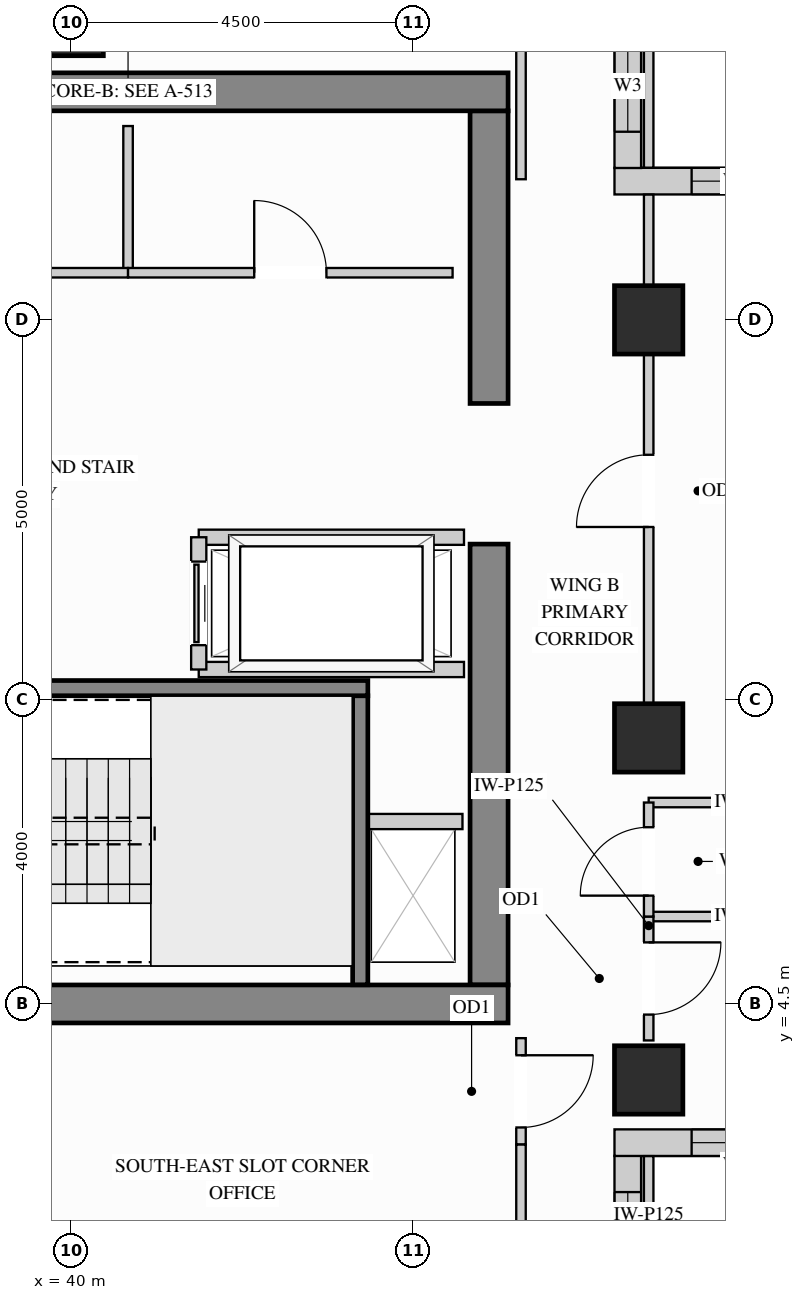
"""IFC4 building model, lengths in metres.
Left out: names, types, materials, properties, quantities, classifications, styles, units other than length and angle.
Written with IfcOpenShell. Run it as: python <this file> out.ifc"""

import sys

from ifc_helpers import new_model, si_unit, direction, frame, frame_2d, origin, origin_2d, place, context, subcontext, project, spatial, rectangle, extrude, source, transform, mapped, element, fill, save


model = new_model("IFC4")
c1 = context("Model", 3, precision=1e-05, world=origin(), true_north=direction((0.0, 1.0)))
c2 = subcontext(c1, "Body", "Model", "MODEL_VIEW")
j1 = project(units=[si_unit("LENGTHUNIT", "METRE"), si_unit("PLANEANGLEUNIT", "RADIAN")], contexts=[c1])
p1 = place(None, origin())
s1 = spatial("IfcSite", under=j1, at=p1, CompositionType="ELEMENT")
p2 = place(p1, origin())
s2 = spatial("IfcBuilding", under=s1, at=p2, CompositionType="ELEMENT")
p3 = place(p2, frame((0.0, 0.0, 248.4)))
s3 = spatial("IfcBuildingStorey", under=s2, at=p3, CompositionType="ELEMENT", Elevation=248.4)
m1 = source(origin(), c2, "Body", "SweptSolid", [
    extrude(rectangle(XDim=0.9, YDim=0.9, at=origin_2d()), origin(), (0.0, 0.0, 1.0), 3.4),
])
for number, where, z_axis, x_axis in (
    (1, (47.6, 13.5, 0.0), (0.0, 0.0, 1.0), (1.0, 0.0, 0.0)),
    (2, (47.6, 3.5, 0.0), (0.0, 0.0, 1.0), (1.0, 0.0, 0.0)),
    (3, (47.6, 8.0, 0.0), (0.0, 0.0, 1.0), (1.0, 0.0, 0.0)),
):
    element("IfcColumn", number, at=place(p3, frame(where, z_axis=z_axis, x_axis=x_axis)), inside=s3, PredefinedType="COLUMN", context=c2, shape_type="MappedRepresentation", body=[
        mapped(m1, transform((0.0, 0.0, 0.0), x_axis=(1.0, 0.0, 0.0), y_axis=(0.0, 1.0, 0.0), z_axis=(0.0, 0.0, 1.0))),
    ])
m2 = source(origin(), c2, "Body", "SweptSolid", [
    extrude(rectangle(XDim=0.85, YDim=0.85, at=origin_2d()), origin(), (0.0, 0.0, 1.0), 3.4),
])
p4 = place(p3, frame((40.0, 17.4, 0.0), z_axis=(0.0, 0.0, 1.0), x_axis=(1.0, 0.0, 0.0)))
e4 = element("IfcColumn", 4, at=p4, inside=s3, PredefinedType="COLUMN", context=c2, shape_type="MappedRepresentation", body=[
    mapped(m2, transform((0.0, 0.0, 0.0), x_axis=(1.0, 0.0, 0.0), y_axis=(0.0, 1.0, 0.0), z_axis=(0.0, 0.0, 1.0))),
])
m3 = source(origin(), c2, "Body", "SweptSolid", [
    extrude(rectangle(XDim=5.8, YDim=0.5, at=frame_2d((2.9, 0.0))), origin(), (0.0, 0.0, 1.0), 3.4),
])
p5 = place(p3, frame((45.5, 4.75, 0.0), z_axis=(0.0, 0.0, 1.0), x_axis=(0.0, 1.0, 0.0)))
e5 = element("IfcWall", 5, at=p5, inside=s3, PredefinedType="SHEAR", context=c2, shape_type="MappedRepresentation", body=[
    mapped(m3, transform((0.0, 0.0, 0.0), x_axis=(1.0, 0.0, 0.0), y_axis=(0.0, 1.0, 0.0), z_axis=(0.0, 0.0, 1.0))),
])
m4 = source(origin(), c2, "Body", "SweptSolid", [
    extrude(rectangle(XDim=3.85, YDim=0.5, at=frame_2d((1.925, 0.0))), origin(), (0.0, 0.0, 1.0), 3.4),
])
p6 = place(p3, frame((45.5, 12.4, 0.0), z_axis=(0.0, 0.0, 1.0), x_axis=(0.0, 1.0, 0.0)))
e6 = element("IfcWall", 6, at=p6, inside=s3, PredefinedType="SHEAR", context=c2, shape_type="MappedRepresentation", body=[
    mapped(m4, transform((0.0, 0.0, 0.0), x_axis=(1.0, 0.0, 0.0), y_axis=(0.0, 1.0, 0.0), z_axis=(0.0, 0.0, 1.0))),
])
m5 = source(origin(), c2, "Body", "SweptSolid", [
    extrude(rectangle(XDim=10.0, YDim=0.5, at=frame_2d((5.0, 0.0))), origin(), (0.0, 0.0, 1.0), 3.4),
])
for number, where, z_axis, x_axis in (
    (7, (35.75, 16.5, 0.0), (0.0, 0.0, 1.0), (1.0, 0.0, 0.0)),
    (8, (35.75, 4.5, 0.0), (0.0, 0.0, 1.0), (1.0, 0.0, 0.0)),
):
    element("IfcWall", number, at=place(p3, frame(where, z_axis=z_axis, x_axis=x_axis)), inside=s3, PredefinedType="SHEAR", context=c2, shape_type="MappedRepresentation", body=[
        mapped(m5, transform((0.0, 0.0, 0.0), x_axis=(1.0, 0.0, 0.0), y_axis=(0.0, 1.0, 0.0), z_axis=(0.0, 0.0, 1.0))),
    ])
p7 = place(p3, frame((47.325, 0.348, 0.0), z_axis=(0.0, 0.0, 1.0), x_axis=(0.0, 1.0, 0.0)))
e9 = element("IfcWall", 9, at=p7, inside=s3, PredefinedType="SOLIDWALL", context=c2, shape_type="SweptSolid", body=[
    extrude(rectangle(XDim=2.154, YDim=0.35, at=frame_2d((1.077, 0.0))), origin(), (0.0, 0.0, 1.0), 3.385),
])
p8 = place(p7, frame((0.477, 0.0, 0.78)))
e10 = element("IfcOpeningElement", 10, at=p8, cuts=e9, PredefinedType="OPENING", context=c2, shape_type="SweptSolid", body=[
    extrude(rectangle(XDim=1.2, YDim=2.25, at=frame_2d((0.6, 1.125))), frame((0.0, 0.185, 0.0), z_axis=(0.0, -1.0, 0.0), x_axis=(1.0, 0.0, 0.0)), (0.0, 0.0, 1.0), 0.37),
])
p9 = place(p3, frame((47.15, 2.675, 0.0), z_axis=(0.0, 0.0, 1.0), x_axis=(1.0, 0.0, 0.0)))
e11 = element("IfcWall", 11, at=p9, inside=s3, PredefinedType="SOLIDWALL", context=c2, shape_type="SweptSolid", body=[
    extrude(rectangle(XDim=2.85, YDim=0.35, at=frame_2d((1.425, 0.0))), origin(), (0.0, 0.0, 1.0), 3.385),
])
p10 = place(p9, frame((1.015, 0.0, 0.78)))
e12 = element("IfcOpeningElement", 12, at=p10, cuts=e11, PredefinedType="OPENING", context=c2, shape_type="SweptSolid", body=[
    extrude(rectangle(XDim=1.2, YDim=2.25, at=frame_2d((0.6, 1.125))), frame((0.0, 0.185, 0.0), z_axis=(0.0, -1.0, 0.0), x_axis=(1.0, 0.0, 0.0)), (0.0, 0.0, 1.0), 0.37),
])
p11 = place(p3, frame((50.0, 15.325, 0.0), z_axis=(0.0, 0.0, 1.0), x_axis=(-1.0, 0.0, 0.0)))
e13 = element("IfcWall", 13, at=p11, inside=s3, PredefinedType="SOLIDWALL", context=c2, shape_type="SweptSolid", body=[
    extrude(rectangle(XDim=2.85, YDim=0.35, at=frame_2d((1.425, 0.0))), origin(), (0.0, 0.0, 1.0), 3.385),
])
p12 = place(p11, frame((0.635, 0.0, 0.78)))
e14 = element("IfcOpeningElement", 14, at=p12, cuts=e13, PredefinedType="OPENING", context=c2, shape_type="SweptSolid", body=[
    extrude(rectangle(XDim=1.2, YDim=2.25, at=frame_2d((0.6, 1.125))), frame((0.0, 0.185, 0.0), z_axis=(0.0, -1.0, 0.0), x_axis=(1.0, 0.0, 0.0)), (0.0, 0.0, 1.0), 0.37),
])
p13 = place(p3, frame((47.325, 15.498, 0.0), z_axis=(0.0, 0.0, 1.0), x_axis=(0.0, 1.0, 0.0)))
e15 = element("IfcWall", 15, at=p13, inside=s3, PredefinedType="SOLIDWALL", context=c2, shape_type="SweptSolid", body=[
    extrude(rectangle(XDim=2.154, YDim=0.35, at=frame_2d((1.077, 0.0))), origin(), (0.0, 0.0, 1.0), 3.385),
])
p14 = place(p13, frame((0.477, 0.0, 0.78)))
e16 = element("IfcOpeningElement", 16, at=p14, cuts=e15, PredefinedType="OPENING", context=c2, shape_type="SweptSolid", body=[
    extrude(rectangle(XDim=1.2, YDim=2.25, at=frame_2d((0.6, 1.125))), frame((0.0, 0.185, 0.0), z_axis=(0.0, -1.0, 0.0), x_axis=(1.0, 0.0, 0.0)), (0.0, 0.0, 1.0), 0.37),
])
m6 = source(origin(), c2, "Body", "SweptSolid", [
    extrude(rectangle(XDim=1.93, YDim=0.125, at=frame_2d((0.965, 0.0))), origin(), (0.0, 0.0, 1.0), 3.385),
])
p15 = place(p3, frame((40.75, 14.12, 0.0), z_axis=(0.0, 0.0, 1.0), x_axis=(0.0, 1.0, 0.0)))
e17 = element("IfcWall", 17, at=p15, inside=s3, PredefinedType="PARTITIONING", context=c2, shape_type="MappedRepresentation", body=[
    mapped(m6, transform((0.0, 0.0, 0.0), x_axis=(1.0, 0.0, 0.0), y_axis=(0.0, 1.0, 0.0), z_axis=(0.0, 0.0, 1.0))),
])
p16 = place(p3, frame((36.5, 14.12, 0.0), z_axis=(0.0, 0.0, 1.0), x_axis=(1.0, 0.0, 0.0)))
e18 = element("IfcWall", 18, at=p16, inside=s3, PredefinedType="PARTITIONING", context=c2, shape_type="SweptSolid", body=[
    extrude(rectangle(XDim=4.25, YDim=0.125, at=frame_2d((2.125, 0.0))), origin(), (0.0, 0.0, 1.0), 3.385),
])
p17 = place(p16, frame((1.65, 0.0, 0.0)))
e19 = element("IfcOpeningElement", 19, at=p17, cuts=e18, PredefinedType="OPENING", context=c2, shape_type="SweptSolid", body=[
    extrude(rectangle(XDim=0.85, YDim=2.1, at=frame_2d((0.425, 1.05))), frame((0.0, 0.073, 0.0), z_axis=(0.0, -1.0, 0.0), x_axis=(1.0, 0.0, 0.0)), (0.0, 0.0, 1.0), 0.145),
])
p18 = place(p3, frame((40.75, 14.12, 0.0), z_axis=(0.0, 0.0, 1.0), x_axis=(1.0, 0.0, 0.0)))
e20 = element("IfcWall", 20, at=p18, inside=s3, PredefinedType="PARTITIONING", context=c2, shape_type="SweptSolid", body=[
    extrude(rectangle(XDim=4.27, YDim=0.125, at=frame_2d((2.135, 0.0))), origin(), (0.0, 0.0, 1.0), 3.385),
])
p19 = place(p18, frame((1.66, 0.0, 0.0)))
e21 = element("IfcOpeningElement", 21, at=p19, cuts=e20, PredefinedType="OPENING", context=c2, shape_type="SweptSolid", body=[
    extrude(rectangle(XDim=0.95, YDim=2.15, at=frame_2d((0.475, 1.075))), frame((0.0, 0.073, 0.0), z_axis=(0.0, -1.0, 0.0), x_axis=(1.0, 0.0, 0.0)), (0.0, 0.0, 1.0), 0.145),
])
m7 = source(origin(), c2, "Body", "SweptSolid", [
    extrude(rectangle(XDim=2.048, YDim=0.125, at=frame_2d((1.024, 0.0))), origin(), (0.0, 0.0, 1.0), 3.385),
])
for number, where, z_axis, x_axis in (
    (22, (47.6, 5.65, 0.0), (0.0, 0.0, 1.0), (1.0, 0.0, 0.0)),
    (23, (47.6, 7.15, 0.0), (0.0, 0.0, 1.0), (1.0, 0.0, 0.0)),
):
    element("IfcWall", number, at=place(p3, frame(where, z_axis=z_axis, x_axis=x_axis)), inside=s3, PredefinedType="PARTITIONING", context=c2, shape_type="MappedRepresentation", body=[
        mapped(m7, transform((0.0, 0.0, 0.0), x_axis=(1.0, 0.0, 0.0), y_axis=(0.0, 1.0, 0.0), z_axis=(0.0, 0.0, 1.0))),
    ])
p20 = place(p3, frame((47.6, 4.02, 0.0), z_axis=(0.0, 0.0, 1.0), x_axis=(0.0, 1.0, 0.0)))
e24 = element("IfcWall", 24, at=p20, inside=s3, PredefinedType="PARTITIONING", context=c2, shape_type="SweptSolid", body=[
    extrude(rectangle(XDim=1.63, YDim=0.125, at=frame_2d((0.815, 0.0))), origin(), (0.0, 0.0, 1.0), 2.773),
])
p21 = place(p20, frame((0.34, 0.0, 0.0)))
e25 = element("IfcOpeningElement", 25, at=p21, cuts=e24, PredefinedType="OPENING", context=c2, shape_type="SweptSolid", body=[
    extrude(rectangle(XDim=0.95, YDim=2.15, at=frame_2d((0.475, 1.075))), frame((0.0, 0.073, 0.0), z_axis=(0.0, -1.0, 0.0), x_axis=(1.0, 0.0, 0.0)), (0.0, 0.0, 1.0), 0.145),
])
m8 = source(origin(), c2, "Body", "SweptSolid", [
    extrude(rectangle(XDim=2.148, YDim=0.125, at=frame_2d((1.074, 0.0))), origin(), (0.0, 0.0, 1.0), 3.385),
])
p22 = place(p3, frame((47.6, 0.35, 0.0), z_axis=(0.0, 0.0, 1.0), x_axis=(0.0, 1.0, 0.0)))
e26 = element("IfcWall", 26, at=p22, inside=s3, PredefinedType="PARTITIONING", context=c2, shape_type="MappedRepresentation", body=[
    mapped(m8, transform((0.0, 0.0, 0.0), x_axis=(1.0, 0.0, 0.0), y_axis=(0.0, 1.0, 0.0), z_axis=(0.0, 0.0, 1.0))),
])
p23 = place(p3, frame((47.6, 8.45, 0.0), z_axis=(0.0, 0.0, 1.0), x_axis=(0.0, 1.0, 0.0)))
e27 = element("IfcWall", 27, at=p23, inside=s3, PredefinedType="PARTITIONING", context=c2, shape_type="SweptSolid", body=[
    extrude(rectangle(XDim=4.6, YDim=0.125, at=frame_2d((2.3, 0.0))), origin(), (0.0, 0.0, 1.0), 2.773),
])
p24 = place(p23, frame((2.325, 0.0, 0.0)))
e28 = element("IfcOpeningElement", 28, at=p24, cuts=e27, PredefinedType="OPENING", context=c2, shape_type="SweptSolid", body=[
    extrude(rectangle(XDim=0.95, YDim=2.15, at=frame_2d((0.475, 1.075))), frame((0.0, 0.073, 0.0), z_axis=(0.0, -1.0, 0.0), x_axis=(1.0, 0.0, 0.0)), (0.0, 0.0, 1.0), 0.145),
])
m9 = source(origin(), c2, "Body", "SweptSolid", [
    extrude(rectangle(XDim=1.198, YDim=0.125, at=frame_2d((0.599, 0.0))), origin(), (0.0, 0.0, 1.0), 3.385),
])
p25 = place(p3, frame((47.6, 13.95, 0.0), z_axis=(0.0, 0.0, 1.0), x_axis=(0.0, 1.0, 0.0)))
e29 = element("IfcWall", 29, at=p25, inside=s3, PredefinedType="PARTITIONING", context=c2, shape_type="MappedRepresentation", body=[
    mapped(m9, transform((0.0, 0.0, 0.0), x_axis=(1.0, 0.0, 0.0), y_axis=(0.0, 1.0, 0.0), z_axis=(0.0, 0.0, 1.0))),
])
p26 = place(p3, frame((47.6, 15.502, 0.0), z_axis=(0.0, 0.0, 1.0), x_axis=(0.0, 1.0, 0.0)))
e30 = element("IfcWall", 30, at=p26, inside=s3, PredefinedType="PARTITIONING", context=c2, shape_type="MappedRepresentation", body=[
    mapped(m8, transform((0.0, 0.0, 0.0), x_axis=(1.0, 0.0, 0.0), y_axis=(0.0, 1.0, 0.0), z_axis=(0.0, 0.0, 1.0))),
])
p27 = place(p3, frame((47.6, 5.65, 0.0), z_axis=(0.0, 0.0, 1.0), x_axis=(0.0, 1.0, 0.0)))
e31 = element("IfcWall", 31, at=p27, inside=s3, PredefinedType="PARTITIONING", context=c2, shape_type="SweptSolid", body=[
    extrude(rectangle(XDim=1.5, YDim=0.125, at=frame_2d((0.75, 0.0))), origin(), (0.0, 0.0, 1.0), 2.773),
])
p28 = place(p27, frame((0.275, 0.0, 0.0)))
e32 = element("IfcOpeningElement", 32, at=p28, cuts=e31, PredefinedType="OPENING", context=c2, shape_type="SweptSolid", body=[
    extrude(rectangle(XDim=0.9, YDim=2.15, at=frame_2d((0.45, 1.075))), frame((0.0, 0.073, 0.0), z_axis=(0.0, -1.0, 0.0), x_axis=(1.0, 0.0, 0.0)), (0.0, 0.0, 1.0), 0.145),
])
m10 = source(origin(), c2, "Body", "SweptSolid", [
    extrude(rectangle(XDim=2.298, YDim=0.125, at=frame_2d((1.149, 0.0))), origin(), (0.0, 0.0, 1.0), 3.385),
])
p29 = place(p3, frame((45.92, 15.35, 0.0), z_axis=(0.0, 0.0, 1.0), x_axis=(0.0, 1.0, 0.0)))
e33 = element("IfcWall", 33, at=p29, inside=s3, PredefinedType="PARTITIONING", context=c2, shape_type="MappedRepresentation", body=[
    mapped(m10, transform((0.0, 0.0, 0.0), x_axis=(1.0, 0.0, 0.0), y_axis=(0.0, 1.0, 0.0), z_axis=(0.0, 0.0, 1.0))),
])
p30 = place(p3, frame((45.92, 2.65, 0.0), z_axis=(0.0, 0.0, 1.0), x_axis=(0.0, 1.0, 0.0)))
e34 = element("IfcWall", 34, at=p30, inside=s3, PredefinedType="PARTITIONING", context=c2, shape_type="SweptSolid", body=[
    extrude(rectangle(XDim=1.4, YDim=0.125, at=frame_2d((0.7, 0.0))), origin(), (0.0, 0.0, 1.0), 3.385),
])
p31 = place(p30, frame((0.225, 0.0, 0.0)))
e35 = element("IfcOpeningElement", 35, at=p31, cuts=e34, PredefinedType="OPENING", context=c2, shape_type="SweptSolid", body=[
    extrude(rectangle(XDim=0.95, YDim=2.15, at=frame_2d((0.475, 1.075))), frame((0.0, 0.073, 0.0), z_axis=(0.0, -1.0, 0.0), x_axis=(1.0, 0.0, 0.0)), (0.0, 0.0, 1.0), 0.145),
])
p32 = place(p3, frame((45.92, 0.352, 0.0), z_axis=(0.0, 0.0, 1.0), x_axis=(0.0, 1.0, 0.0)))
e36 = element("IfcWall", 36, at=p32, inside=s3, PredefinedType="PARTITIONING", context=c2, shape_type="MappedRepresentation", body=[
    mapped(m10, transform((0.0, 0.0, 0.0), x_axis=(1.0, 0.0, 0.0), y_axis=(0.0, 1.0, 0.0), z_axis=(0.0, 0.0, 1.0))),
])
m11 = source(origin(), c2, "Body", "SweptSolid", [
    extrude(rectangle(XDim=1.3, YDim=0.2, at=frame_2d((0.65, 0.0))), origin(), (0.0, 0.0, 1.0), 3.385),
])
p33 = place(p3, frame((43.85, 6.9, 0.0), z_axis=(0.0, 0.0, 1.0), x_axis=(1.0, 0.0, 0.0)))
e37 = element("IfcWall", 37, at=p33, inside=s3, PredefinedType="PARTITIONING", context=c2, shape_type="MappedRepresentation", body=[
    mapped(m11, transform((0.0, 0.0, 0.0), x_axis=(1.0, 0.0, 0.0), y_axis=(0.0, 1.0, 0.0), z_axis=(0.0, 0.0, 1.0))),
])
m12 = source(origin(), c2, "Body", "SweptSolid", [
    extrude(rectangle(XDim=3.49, YDim=0.2, at=frame_2d((1.745, 0.0))), origin(), (0.0, 0.0, 1.0), 3.385),
])
for number, where, z_axis, x_axis in (
    (38, (41.68, 10.64, 0.0), (0.0, 0.0, 1.0), (1.0, 0.0, 0.0)),
    (39, (41.68, 8.9, 0.0), (0.0, 0.0, 1.0), (1.0, 0.0, 0.0)),
):
    element("IfcWall", number, at=place(p3, frame(where, z_axis=z_axis, x_axis=x_axis)), inside=s3, PredefinedType="PARTITIONING", context=c2, shape_type="MappedRepresentation", body=[
        mapped(m12, transform((0.0, 0.0, 0.0), x_axis=(1.0, 0.0, 0.0), y_axis=(0.0, 1.0, 0.0), z_axis=(0.0, 0.0, 1.0))),
    ])
p34 = place(p3, frame((41.68, 8.9, 0.0), z_axis=(0.0, 0.0, 1.0), x_axis=(0.0, 1.0, 0.0)))
e40 = element("IfcWall", 40, at=p34, inside=s3, PredefinedType="PARTITIONING", context=c2, shape_type="SweptSolid", body=[
    extrude(rectangle(XDim=1.74, YDim=0.2, at=frame_2d((0.87, 0.0))), origin(), (0.0, 0.0, 1.0), 3.385),
])
p35 = place(p34, frame((0.32, 0.0, 0.0)))
e41 = element("IfcOpeningElement", 41, at=p35, cuts=e40, PredefinedType="OPENING", context=c2, shape_type="SweptSolid", body=[
    extrude(rectangle(XDim=1.1, YDim=2.2, at=frame_2d((0.55, 1.1))), frame((0.0, 0.11, 0.0), z_axis=(0.0, -1.0, 0.0), x_axis=(1.0, 0.0, 0.0)), (0.0, 0.0, 1.0), 0.22),
])
m13 = source(origin(), c2, "Body", "SweptSolid", [
    extrude(rectangle(XDim=3.803, YDim=0.2, at=frame_2d((1.901, 0.0))), origin(), (0.0, 0.0, 1.0), 3.4),
])
p36 = place(p3, frame((43.805, 4.752, 0.0), z_axis=(0.0, 0.0, 1.0), x_axis=(0.0, 1.0, 0.0)))
e42 = element("IfcWall", 42, at=p36, inside=s3, PredefinedType="SHEAR", context=c2, shape_type="MappedRepresentation", body=[
    mapped(m13, transform((0.0, 0.0, 0.0), x_axis=(1.0, 0.0, 0.0), y_axis=(0.0, 1.0, 0.0), z_axis=(0.0, 0.0, 1.0))),
])
p37 = place(p3, frame((36.252, 8.655, 0.0), z_axis=(0.0, 0.0, 1.0), x_axis=(1.0, 0.0, 0.0)))
e43 = element("IfcWall", 43, at=p37, inside=s3, PredefinedType="SHEAR", context=c2, shape_type="SweptSolid", body=[
    extrude(rectangle(XDim=7.653, YDim=0.2, at=frame_2d((3.827, 0.0))), origin(), (0.0, 0.0, 1.0), 3.4),
])
p38 = place(p37, frame((0.35, 0.0, 0.0)))
e44 = element("IfcOpeningElement", 44, at=p38, cuts=e43, PredefinedType="OPENING", context=c2, shape_type="SweptSolid", body=[
    extrude(rectangle(XDim=1.1, YDim=2.15, at=frame_2d((0.55, 1.075))), frame((0.0, 0.11, 0.0), z_axis=(0.0, -1.0, 0.0), x_axis=(1.0, 0.0, 0.0)), (0.0, 0.0, 1.0), 0.22),
])
m14 = source(origin(), c2, "Body", "SweptSolid", [
    extrude(rectangle(XDim=1.1, YDim=2.2, at=frame_2d((0.55, 1.1))), frame((0.0, 0.025, 0.0), z_axis=(0.0, -1.0, 0.0), x_axis=(1.0, 0.0, 0.0)), (0.0, 0.0, 1.0), 0.05),
])
p39 = place(p35, origin())
e45 = element("IfcDoor", 45, at=p39, inside=s3, OperationType="SLIDING_TO_LEFT", PredefinedType="DOOR", context=c2, shape_type="MappedRepresentation", body=[
    mapped(m14, transform((0.0, 0.0, 0.0), x_axis=(1.0, 0.0, 0.0), y_axis=(0.0, 1.0, 0.0), z_axis=(0.0, 0.0, 1.0))),
])
fill(e41, e45)
m15 = source(origin(), c2, "Body", "SweptSolid", [
    extrude(rectangle(XDim=0.95, YDim=2.15, at=frame_2d((0.475, 1.075))), frame((0.0, 0.025, 0.0), z_axis=(0.0, -1.0, 0.0), x_axis=(1.0, 0.0, 0.0)), (0.0, 0.0, 1.0), 0.05),
])
p40 = place(p19, origin())
e46 = element("IfcDoor", 46, at=p40, inside=s3, OperationType="SINGLE_SWING_LEFT", PredefinedType="DOOR", context=c2, shape_type="MappedRepresentation", body=[
    mapped(m15, transform((0.0, 0.0, 0.0), x_axis=(1.0, 0.0, 0.0), y_axis=(0.0, 1.0, 0.0), z_axis=(0.0, 0.0, 1.0))),
])
fill(e21, e46)
p41 = place(p31, origin())
e47 = element("IfcDoor", 47, at=p41, inside=s3, OperationType="SINGLE_SWING_RIGHT", PredefinedType="DOOR", context=c2, shape_type="MappedRepresentation", body=[
    mapped(m15, transform((0.0, 0.0, 0.0), x_axis=(1.0, 0.0, 0.0), y_axis=(0.0, 1.0, 0.0), z_axis=(0.0, 0.0, 1.0))),
])
fill(e35, e47)
p42 = place(p21, origin())
e48 = element("IfcDoor", 48, at=p42, inside=s3, OperationType="SINGLE_SWING_RIGHT", PredefinedType="DOOR", context=c2, shape_type="MappedRepresentation", body=[
    mapped(m15, transform((0.0, 0.0, 0.0), x_axis=(1.0, 0.0, 0.0), y_axis=(0.0, 1.0, 0.0), z_axis=(0.0, 0.0, 1.0))),
])
fill(e25, e48)
p43 = place(p24, origin())
e49 = element("IfcDoor", 49, at=p43, inside=s3, OperationType="SINGLE_SWING_LEFT", PredefinedType="DOOR", context=c2, shape_type="MappedRepresentation", body=[
    mapped(m15, transform((0.0, 0.0, 0.0), x_axis=(1.0, 0.0, 0.0), y_axis=(0.0, 1.0, 0.0), z_axis=(0.0, 0.0, 1.0))),
])
fill(e28, e49)
m16 = source(origin(), c2, "Body", "SweptSolid", [
    extrude(rectangle(XDim=0.9, YDim=2.15, at=frame_2d((0.45, 1.075))), frame((0.0, 0.025, 0.0), z_axis=(0.0, -1.0, 0.0), x_axis=(1.0, 0.0, 0.0)), (0.0, 0.0, 1.0), 0.05),
])
p44 = place(p28, origin())
e50 = element("IfcDoor", 50, at=p44, inside=s3, OperationType="SINGLE_SWING_LEFT", PredefinedType="DOOR", context=c2, shape_type="MappedRepresentation", body=[
    mapped(m16, transform((0.0, 0.0, 0.0), x_axis=(1.0, 0.0, 0.0), y_axis=(0.0, 1.0, 0.0), z_axis=(0.0, 0.0, 1.0))),
])
fill(e32, e50)
m17 = source(origin(), c2, "Body", "SweptSolid", [
    extrude(rectangle(XDim=1.2, YDim=2.25, at=frame_2d((0.6, 1.125))), frame((0.0, 0.03, 0.0), z_axis=(0.0, -1.0, 0.0), x_axis=(1.0, 0.0, 0.0)), (0.0, 0.0, 1.0), 0.06),
])
p45 = place(p8, origin())
e51 = element("IfcWindow", 51, at=p45, inside=s3, PartitioningType="SINGLE_PANEL", PredefinedType="WINDOW", context=c2, shape_type="MappedRepresentation", body=[
    mapped(m17, transform((0.0, 0.0, 0.0), x_axis=(1.0, 0.0, 0.0), y_axis=(0.0, 1.0, 0.0), z_axis=(0.0, 0.0, 1.0))),
])
fill(e10, e51)
p46 = place(p10, origin())
e52 = element("IfcWindow", 52, at=p46, inside=s3, PartitioningType="SINGLE_PANEL", PredefinedType="WINDOW", context=c2, shape_type="MappedRepresentation", body=[
    mapped(m17, transform((0.0, 0.0, 0.0), x_axis=(1.0, 0.0, 0.0), y_axis=(0.0, 1.0, 0.0), z_axis=(0.0, 0.0, 1.0))),
])
fill(e12, e52)
p47 = place(p12, origin())
e53 = element("IfcWindow", 53, at=p47, inside=s3, PartitioningType="SINGLE_PANEL", PredefinedType="WINDOW", context=c2, shape_type="MappedRepresentation", body=[
    mapped(m17, transform((0.0, 0.0, 0.0), x_axis=(1.0, 0.0, 0.0), y_axis=(0.0, 1.0, 0.0), z_axis=(0.0, 0.0, 1.0))),
])
fill(e14, e53)
p48 = place(p14, origin())
e54 = element("IfcWindow", 54, at=p48, inside=s3, PartitioningType="SINGLE_PANEL", PredefinedType="WINDOW", context=c2, shape_type="MappedRepresentation", body=[
    mapped(m17, transform((0.0, 0.0, 0.0), x_axis=(1.0, 0.0, 0.0), y_axis=(0.0, 1.0, 0.0), z_axis=(0.0, 0.0, 1.0))),
])
fill(e16, e54)
save(model, sys.argv[1])
